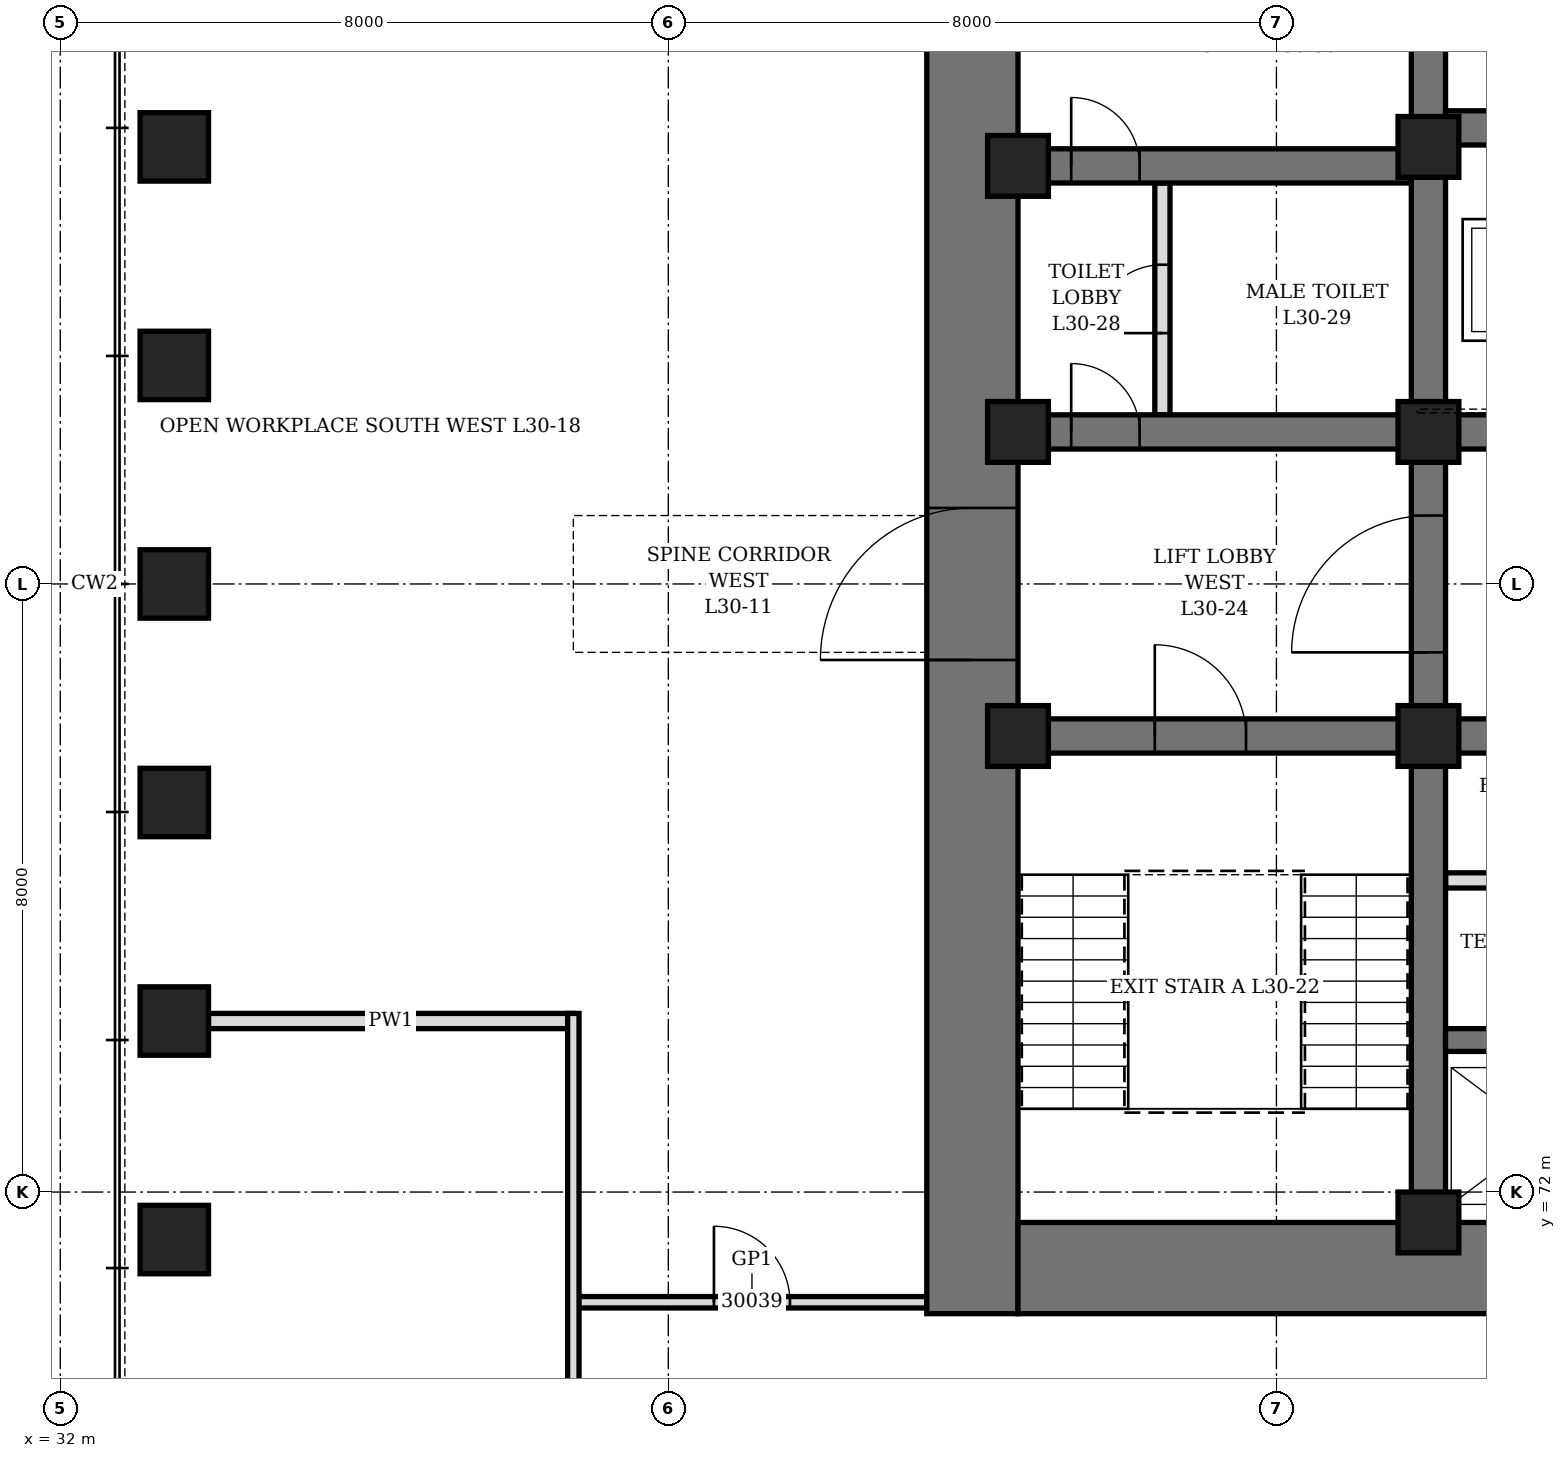
"""IFC4 building model, lengths in metres.
Left out: names, types, materials, properties, quantities, classifications, styles, units other than length and angle.
Written with IfcOpenShell. Run it as: python <this file> out.ifc"""

import sys

from ifc_helpers import new_model, si_unit, direction, frame, frame_2d, origin, origin_2d, place, context, subcontext, project, spatial, rectangle, hollow_rectangle, extrude, element, fill, save


model = new_model("IFC4")
c1 = context("Model", 3, precision=1e-05, world=origin(), true_north=direction((0.0, 1.0)))
c2 = subcontext(c1, "Body", "Model", "MODEL_VIEW")
j1 = project(units=[si_unit("LENGTHUNIT", "METRE"), si_unit("PLANEANGLEUNIT", "RADIAN")], contexts=[c1])
p1 = place(None, origin())
s1 = spatial("IfcSite", under=j1, at=p1, CompositionType="ELEMENT")
p2 = place(p1, origin())
s2 = spatial("IfcBuilding", under=s1, at=p2, CompositionType="ELEMENT")
p3 = place(p2, frame((0.0, 0.0, 137.5)))
s3 = spatial("IfcBuildingStorey", under=s2, at=p3, CompositionType="ELEMENT", Elevation=137.5)
for number, where, z_axis, x_axis in (
    (1, (33.5, 85.75, 0.0), (0.0, 0.0, 1.0), (0.0, 1.0, 0.0)),
    (2, (33.5, 82.875, 0.0), (0.0, 0.0, 1.0), (0.0, 1.0, 0.0)),
    (3, (33.5, 80.0, 0.0), (0.0, 0.0, 1.0), (0.0, 1.0, 0.0)),
    (4, (33.5, 77.125, 0.0), (0.0, 0.0, 1.0), (0.0, 1.0, 0.0)),
    (5, (33.5, 74.25, 0.0), (0.0, 0.0, 1.0), (0.0, 1.0, 0.0)),
    (6, (33.5, 71.375, 0.0), (0.0, 0.0, 1.0), (0.0, 1.0, 0.0)),
):
    element("IfcColumn", number, at=place(p3, frame(where, z_axis=z_axis, x_axis=x_axis)), inside=s3, PredefinedType="COLUMN", context=c2, shape_type="SweptSolid", body=[
        extrude(hollow_rectangle(XDim=0.9, YDim=0.9, WallThickness=0.15, at=origin_2d()), origin(), (0.0, 0.0, 1.0), 4.2),
    ])
p4 = place(p3, frame((44.0, 70.4, 0.0), z_axis=(0.0, 0.0, 1.0), x_axis=(0.0, 1.0, 0.0)))
e7 = element("IfcWall", 7, at=p4, inside=s3, PredefinedType="SHEAR", context=c2, shape_type="SweptSolid", body=[
    extrude(rectangle(XDim=19.2, YDim=1.2, at=frame_2d((9.6, 0.0))), origin(), (0.0, 0.0, 1.0), 4.2),
])
p5 = place(p4, frame((8.6, 0.0, 0.0)))
e8 = element("IfcOpeningElement", 8, at=p5, cuts=e7, PredefinedType="OPENING", context=c2, shape_type="SweptSolid", body=[
    extrude(rectangle(XDim=2.0, YDim=2.4, at=frame_2d((1.0, 1.2))), frame((0.0, 0.61, 0.0), z_axis=(0.0, -1.0, 0.0), x_axis=(1.0, 0.0, 0.0)), (0.0, 0.0, 1.0), 1.22),
])
p6 = place(p3, frame((44.6, 71.0, 0.0), z_axis=(0.0, 0.0, 1.0), x_axis=(1.0, 0.0, 0.0)))
e9 = element("IfcWall", 9, at=p6, inside=s3, PredefinedType="SHEAR", context=c2, shape_type="SweptSolid", body=[
    extrude(rectangle(XDim=22.8, YDim=1.2, at=frame_2d((11.4, 0.0))), origin(), (0.0, 0.0, 1.0), 4.2),
])
p7 = place(p3, frame((50.0, 71.6, 0.0), z_axis=(0.0, 0.0, 1.0), x_axis=(0.0, 1.0, 0.0)))
e10 = element("IfcWall", 10, at=p7, inside=s3, PredefinedType="SHEAR", context=c2, shape_type="SweptSolid", body=[
    extrude(rectangle(XDim=16.8, YDim=0.45, at=frame_2d((8.4, 0.0))), origin(), (0.0, 0.0, 1.0), 4.2),
])
p8 = place(p7, frame((7.5, 0.0, 0.0)))
e11 = element("IfcOpeningElement", 11, at=p8, cuts=e10, PredefinedType="OPENING", context=c2, shape_type="SweptSolid", body=[
    extrude(rectangle(XDim=1.8, YDim=2.4, at=frame_2d((0.9, 1.2))), frame((0.0, 0.235, 0.0), z_axis=(0.0, -1.0, 0.0), x_axis=(1.0, 0.0, 0.0)), (0.0, 0.0, 1.0), 0.47),
])
p9 = place(p3, frame((44.6, 78.0, 0.0), z_axis=(0.0, 0.0, 1.0), x_axis=(1.0, 0.0, 0.0)))
e12 = element("IfcWall", 12, at=p9, inside=s3, PredefinedType="SHEAR", context=c2, shape_type="SweptSolid", body=[
    extrude(rectangle(XDim=5.175, YDim=0.45, at=frame_2d((2.587, 0.0))), origin(), (0.0, 0.0, 1.0), 4.2),
])
p10 = place(p9, frame((1.8, 0.0, 0.0)))
e13 = element("IfcOpeningElement", 13, at=p10, cuts=e12, PredefinedType="OPENING", context=c2, shape_type="SweptSolid", body=[
    extrude(rectangle(XDim=1.2, YDim=2.1, at=frame_2d((0.6, 1.05))), frame((0.0, 0.235, 0.0), z_axis=(0.0, -1.0, 0.0), x_axis=(1.0, 0.0, 0.0)), (0.0, 0.0, 1.0), 0.47),
])
p11 = place(p3, frame((44.6, 82.0, 0.0), z_axis=(0.0, 0.0, 1.0), x_axis=(1.0, 0.0, 0.0)))
e14 = element("IfcWall", 14, at=p11, inside=s3, PredefinedType="SHEAR", context=c2, shape_type="SweptSolid", body=[
    extrude(rectangle(XDim=5.175, YDim=0.45, at=frame_2d((2.587, 0.0))), origin(), (0.0, 0.0, 1.0), 4.2),
])
p12 = place(p11, frame((0.7, 0.0, 0.0)))
e15 = element("IfcOpeningElement", 15, at=p12, cuts=e14, PredefinedType="OPENING", context=c2, shape_type="SweptSolid", body=[
    extrude(rectangle(XDim=0.9, YDim=2.1, at=frame_2d((0.45, 1.05))), frame((0.0, 0.235, 0.0), z_axis=(0.0, -1.0, 0.0), x_axis=(1.0, 0.0, 0.0)), (0.0, 0.0, 1.0), 0.47),
])
p13 = place(p3, frame((44.6, 85.5, 0.0), z_axis=(0.0, 0.0, 1.0), x_axis=(1.0, 0.0, 0.0)))
e16 = element("IfcWall", 16, at=p13, inside=s3, PredefinedType="SHEAR", context=c2, shape_type="SweptSolid", body=[
    extrude(rectangle(XDim=5.175, YDim=0.45, at=frame_2d((2.587, 0.0))), origin(), (0.0, 0.0, 1.0), 4.2),
])
p14 = place(p13, frame((0.7, 0.0, 0.0)))
e17 = element("IfcOpeningElement", 17, at=p14, cuts=e16, PredefinedType="OPENING", context=c2, shape_type="SweptSolid", body=[
    extrude(rectangle(XDim=0.9, YDim=2.1, at=frame_2d((0.45, 1.05))), frame((0.0, 0.235, 0.0), z_axis=(0.0, -1.0, 0.0), x_axis=(1.0, 0.0, 0.0)), (0.0, 0.0, 1.0), 0.47),
])
p15 = place(p3, frame((50.225, 78.0, 0.0), z_axis=(0.0, 0.0, 1.0), x_axis=(1.0, 0.0, 0.0)))
e18 = element("IfcWall", 18, at=p15, inside=s3, PredefinedType="SHEAR", context=c2, shape_type="SweptSolid", body=[
    extrude(rectangle(XDim=11.55, YDim=0.45, at=frame_2d((5.775, 0.0))), origin(), (0.0, 0.0, 1.0), 4.2),
])
p16 = place(p15, frame((0.825, 0.0, 0.0)))
e19 = element("IfcOpeningElement", 19, at=p16, cuts=e18, PredefinedType="OPENING", context=c2, shape_type="SweptSolid", body=[
    extrude(rectangle(XDim=0.9, YDim=2.1, at=frame_2d((0.45, 1.05))), frame((0.0, 0.235, 0.0), z_axis=(0.0, -1.0, 0.0), x_axis=(1.0, 0.0, 0.0)), (0.0, 0.0, 1.0), 0.47),
])
p17 = place(p15, frame((3.825, 0.0, 0.0)))
e20 = element("IfcOpeningElement", 20, at=p17, cuts=e18, PredefinedType="OPENING", context=c2, shape_type="SweptSolid", body=[
    extrude(rectangle(XDim=0.9, YDim=2.1, at=frame_2d((0.45, 1.05))), frame((0.0, 0.235, 0.0), z_axis=(0.0, -1.0, 0.0), x_axis=(1.0, 0.0, 0.0)), (0.0, 0.0, 1.0), 0.47),
])
p18 = place(p15, frame((6.825, 0.0, 0.0)))
e21 = element("IfcOpeningElement", 21, at=p18, cuts=e18, PredefinedType="OPENING", context=c2, shape_type="SweptSolid", body=[
    extrude(rectangle(XDim=0.9, YDim=2.1, at=frame_2d((0.45, 1.05))), frame((0.0, 0.235, 0.0), z_axis=(0.0, -1.0, 0.0), x_axis=(1.0, 0.0, 0.0)), (0.0, 0.0, 1.0), 0.47),
])
p19 = place(p15, frame((9.825, 0.0, 0.0)))
e22 = element("IfcOpeningElement", 22, at=p19, cuts=e18, PredefinedType="OPENING", context=c2, shape_type="SweptSolid", body=[
    extrude(rectangle(XDim=0.9, YDim=2.1, at=frame_2d((0.45, 1.05))), frame((0.0, 0.235, 0.0), z_axis=(0.0, -1.0, 0.0), x_axis=(1.0, 0.0, 0.0)), (0.0, 0.0, 1.0), 0.47),
])
p20 = place(p3, frame((50.225, 82.0, 0.0), z_axis=(0.0, 0.0, 1.0), x_axis=(1.0, 0.0, 0.0)))
e23 = element("IfcWall", 23, at=p20, inside=s3, PredefinedType="SHEAR", context=c2, shape_type="SweptSolid", body=[
    extrude(rectangle(XDim=11.55, YDim=0.45, at=frame_2d((5.775, 0.0))), origin(), (0.0, 0.0, 1.0), 4.2),
])
p21 = place(p20, frame((0.725, 0.0, 0.0)))
e24 = element("IfcOpeningElement", 24, at=p21, cuts=e23, PredefinedType="OPENING", context=c2, shape_type="SweptSolid", body=[
    extrude(rectangle(XDim=1.1, YDim=2.2, at=frame_2d((0.55, 1.1))), frame((0.0, 0.235, 0.0), z_axis=(0.0, -1.0, 0.0), x_axis=(1.0, 0.0, 0.0)), (0.0, 0.0, 1.0), 0.47),
])
p22 = place(p20, frame((3.725, 0.0, 0.0)))
e25 = element("IfcOpeningElement", 25, at=p22, cuts=e23, PredefinedType="OPENING", context=c2, shape_type="SweptSolid", body=[
    extrude(rectangle(XDim=1.1, YDim=2.2, at=frame_2d((0.55, 1.1))), frame((0.0, 0.235, 0.0), z_axis=(0.0, -1.0, 0.0), x_axis=(1.0, 0.0, 0.0)), (0.0, 0.0, 1.0), 0.47),
])
p23 = place(p20, frame((6.725, 0.0, 0.0)))
e26 = element("IfcOpeningElement", 26, at=p23, cuts=e23, PredefinedType="OPENING", context=c2, shape_type="SweptSolid", body=[
    extrude(rectangle(XDim=1.1, YDim=2.2, at=frame_2d((0.55, 1.1))), frame((0.0, 0.235, 0.0), z_axis=(0.0, -1.0, 0.0), x_axis=(1.0, 0.0, 0.0)), (0.0, 0.0, 1.0), 0.47),
])
p24 = place(p20, frame((9.725, 0.0, 0.0)))
e27 = element("IfcOpeningElement", 27, at=p24, cuts=e23, PredefinedType="OPENING", context=c2, shape_type="SweptSolid", body=[
    extrude(rectangle(XDim=1.1, YDim=2.2, at=frame_2d((0.55, 1.1))), frame((0.0, 0.235, 0.0), z_axis=(0.0, -1.0, 0.0), x_axis=(1.0, 0.0, 0.0)), (0.0, 0.0, 1.0), 0.47),
])
p25 = place(p3, frame((50.225, 86.0, 0.0), z_axis=(0.0, 0.0, 1.0), x_axis=(1.0, 0.0, 0.0)))
e28 = element("IfcWall", 28, at=p25, inside=s3, PredefinedType="SHEAR", context=c2, shape_type="SweptSolid", body=[
    extrude(rectangle(XDim=11.55, YDim=0.45, at=frame_2d((5.775, 0.0))), origin(), (0.0, 0.0, 1.0), 4.2),
])
p26 = place(p3, frame((50.225, 74.0, 0.0), z_axis=(0.0, 0.0, 1.0), x_axis=(1.0, 0.0, 0.0)))
e29 = element("IfcWall", 29, at=p26, inside=s3, PredefinedType="SHEAR", context=c2, shape_type="SweptSolid", body=[
    extrude(rectangle(XDim=11.55, YDim=0.3, at=frame_2d((5.775, 0.0))), origin(), (0.0, 0.0, 1.0), 4.2),
])
for number, where, z_axis, x_axis in (
    (30, (44.6, 78.0, 0.0), (0.0, 0.0, 1.0), (1.0, 0.0, 0.0)),
    (31, (44.6, 82.0, 0.0), (0.0, 0.0, 1.0), (1.0, 0.0, 0.0)),
    (32, (44.6, 85.5, 0.0), (0.0, 0.0, 1.0), (1.0, 0.0, 0.0)),
    (33, (50.0, 71.6, 0.0), (0.0, 0.0, 1.0), (1.0, 0.0, 0.0)),
    (34, (50.0, 78.0, 0.0), (0.0, 0.0, 1.0), (1.0, 0.0, 0.0)),
    (35, (50.0, 82.0, 0.0), (0.0, 0.0, 1.0), (1.0, 0.0, 0.0)),
    (36, (50.0, 85.75, 0.0), (0.0, 0.0, 1.0), (1.0, 0.0, 0.0)),
):
    element("IfcColumn", number, at=place(p3, frame(where, z_axis=z_axis, x_axis=x_axis)), inside=s3, PredefinedType="COLUMN", context=c2, shape_type="SweptSolid", body=[
        extrude(hollow_rectangle(XDim=0.8, YDim=0.8, WallThickness=0.1, at=origin_2d()), origin(), (0.0, 0.0, 1.0), 4.2),
    ])
p27 = place(p3, frame((46.5, 82.225, 0.0), z_axis=(0.0, 0.0, 1.0), x_axis=(0.0, 1.0, 0.0)))
e37 = element("IfcWall", 37, at=p27, inside=s3, PredefinedType="PARTITIONING", context=c2, shape_type="SweptSolid", body=[
    extrude(rectangle(XDim=3.05, YDim=0.2, at=frame_2d((1.525, 0.0))), origin(), (0.0, 0.0, 1.0), 4.04),
])
p28 = place(p27, frame((1.075, 0.0, 0.0)))
e38 = element("IfcOpeningElement", 38, at=p28, cuts=e37, PredefinedType="OPENING", context=c2, shape_type="SweptSolid", body=[
    extrude(rectangle(XDim=0.9, YDim=2.1, at=frame_2d((0.45, 1.05))), frame((0.0, 0.11, 0.0), z_axis=(0.0, -1.0, 0.0), x_axis=(1.0, 0.0, 0.0)), (0.0, 0.0, 1.0), 0.22),
])
p29 = place(p3, frame((50.225, 76.1, 0.0), z_axis=(0.0, 0.0, 1.0), x_axis=(1.0, 0.0, 0.0)))
e39 = element("IfcWall", 39, at=p29, inside=s3, PredefinedType="PARTITIONING", context=c2, shape_type="SweptSolid", body=[
    extrude(rectangle(XDim=2.55, YDim=0.2, at=frame_2d((1.275, 0.0))), origin(), (0.0, 0.0, 1.0), 4.04),
])
p30 = place(p29, frame((0.825, 0.0, 0.0)))
e40 = element("IfcOpeningElement", 40, at=p30, cuts=e39, PredefinedType="OPENING", context=c2, shape_type="SweptSolid", body=[
    extrude(rectangle(XDim=0.9, YDim=2.1, at=frame_2d((0.45, 1.05))), frame((0.0, 0.11, 0.0), z_axis=(0.0, -1.0, 0.0), x_axis=(1.0, 0.0, 0.0)), (0.0, 0.0, 1.0), 0.22),
])
p31 = place(p3, frame((33.95, 74.25, 0.0), z_axis=(0.0, 0.0, 1.0), x_axis=(1.0, 0.0, 0.0)))
e41 = element("IfcWall", 41, at=p31, inside=s3, PredefinedType="PARTITIONING", context=c2, shape_type="SweptSolid", body=[
    extrude(rectangle(XDim=4.8, YDim=0.2, at=frame_2d((2.4, 0.0))), origin(), (0.0, 0.0, 1.0), 3.428),
])
p32 = place(p3, frame((38.8, 70.55, 0.0), z_axis=(0.0, 0.0, 1.0), x_axis=(1.0, 0.0, 0.0)))
e42 = element("IfcWall", 42, at=p32, inside=s3, PredefinedType="PARTITIONING", context=c2, shape_type="SweptSolid", body=[
    extrude(rectangle(XDim=4.6, YDim=0.15, at=frame_2d((2.3, 0.0))), origin(), (0.0, 0.0, 1.0), 4.04),
])
p33 = place(p32, frame((1.8, 0.0, 0.0)))
e43 = element("IfcOpeningElement", 43, at=p33, cuts=e42, PredefinedType="OPENING", context=c2, shape_type="SweptSolid", body=[
    extrude(rectangle(XDim=1.0, YDim=2.4, at=frame_2d((0.5, 1.2))), frame((0.0, 0.085, 0.0), z_axis=(0.0, -1.0, 0.0), x_axis=(1.0, 0.0, 0.0)), (0.0, 0.0, 1.0), 0.17),
])
p34 = place(p3, frame((38.75, 63.2, 0.0), z_axis=(0.0, 0.0, 1.0), x_axis=(0.0, 1.0, 0.0)))
e44 = element("IfcWall", 44, at=p34, inside=s3, PredefinedType="PARTITIONING", context=c2, shape_type="SweptSolid", body=[
    extrude(rectangle(XDim=11.15, YDim=0.15, at=frame_2d((5.575, 0.0))), origin(), (0.0, 0.0, 1.0), 4.04),
])
p35 = place(p34, frame((3.363, 0.0, 0.0)))
e45 = element("IfcOpeningElement", 45, at=p35, cuts=e44, PredefinedType="OPENING", context=c2, shape_type="SweptSolid", body=[
    extrude(rectangle(XDim=1.0, YDim=2.4, at=frame_2d((0.5, 1.2))), frame((0.0, 0.085, 0.0), z_axis=(0.0, -1.0, 0.0), x_axis=(1.0, 0.0, 0.0)), (0.0, 0.0, 1.0), 0.17),
])
p36 = place(p12, origin())
e46 = element("IfcDoor", 46, at=p36, inside=s3, OperationType="SINGLE_SWING_LEFT", PredefinedType="DOOR", context=c2, shape_type="SweptSolid", body=[
    extrude(rectangle(XDim=0.9, YDim=2.1, at=frame_2d((0.45, 1.05))), frame((0.0, 0.225, 0.0), z_axis=(0.0, -1.0, 0.0), x_axis=(1.0, 0.0, 0.0)), (0.0, 0.0, 1.0), 0.449),
])
fill(e15, e46)
p37 = place(p28, origin())
e47 = element("IfcDoor", 47, at=p37, inside=s3, OperationType="SINGLE_SWING_RIGHT", PredefinedType="DOOR", context=c2, shape_type="SweptSolid", body=[
    extrude(rectangle(XDim=0.9, YDim=2.1, at=frame_2d((0.45, 1.05))), frame((0.0, 0.1, 0.0), z_axis=(0.0, -1.0, 0.0), x_axis=(1.0, 0.0, 0.0)), (0.0, 0.0, 1.0), 0.199),
])
fill(e38, e47)
p38 = place(p14, origin())
e48 = element("IfcDoor", 48, at=p38, inside=s3, OperationType="SINGLE_SWING_RIGHT", PredefinedType="DOOR", context=c2, shape_type="SweptSolid", body=[
    extrude(rectangle(XDim=0.9, YDim=2.1, at=frame_2d((0.45, 1.05))), frame((0.0, 0.225, 0.0), z_axis=(0.0, -1.0, 0.0), x_axis=(1.0, 0.0, 0.0)), (0.0, 0.0, 1.0), 0.449),
])
fill(e17, e48)
p39 = place(p10, origin())
e49 = element("IfcDoor", 49, at=p39, inside=s3, OperationType="SINGLE_SWING_LEFT", PredefinedType="DOOR", context=c2, shape_type="SweptSolid", body=[
    extrude(rectangle(XDim=1.2, YDim=2.1, at=frame_2d((0.6, 1.05))), frame((0.0, 0.225, 0.0), z_axis=(0.0, -1.0, 0.0), x_axis=(1.0, 0.0, 0.0)), (0.0, 0.0, 1.0), 0.449),
])
fill(e13, e49)
p40 = place(p5, origin())
e50 = element("IfcDoor", 50, at=p40, inside=s3, OperationType="DOUBLE_DOOR_SINGLE_SWING", PredefinedType="DOOR", context=c2, shape_type="SweptSolid", body=[
    extrude(rectangle(XDim=2.0, YDim=2.4, at=frame_2d((1.0, 1.2))), frame((0.0, 0.35, 0.0), z_axis=(0.0, -1.0, 0.0), x_axis=(1.0, 0.0, 0.0)), (0.0, 0.0, 1.0), 0.7),
])
fill(e8, e50)
p41 = place(p8, origin())
e51 = element("IfcDoor", 51, at=p41, inside=s3, OperationType="DOUBLE_DOOR_SINGLE_SWING", PredefinedType="DOOR", context=c2, shape_type="SweptSolid", body=[
    extrude(rectangle(XDim=1.8, YDim=2.4, at=frame_2d((0.9, 1.2))), frame((0.0, 0.225, 0.0), z_axis=(0.0, -1.0, 0.0), x_axis=(1.0, 0.0, 0.0)), (0.0, 0.0, 1.0), 0.449),
])
fill(e11, e51)
p42 = place(p33, origin())
e52 = element("IfcDoor", 52, at=p42, inside=s3, OperationType="SINGLE_SWING_RIGHT", PredefinedType="DOOR", context=c2, shape_type="SweptSolid", body=[
    extrude(rectangle(XDim=1.0, YDim=2.4, at=frame_2d((0.5, 1.2))), frame((0.0, 0.075, 0.0), z_axis=(0.0, -1.0, 0.0), x_axis=(1.0, 0.0, 0.0)), (0.0, 0.0, 1.0), 0.149),
])
fill(e43, e52)
save(model, sys.argv[1])
